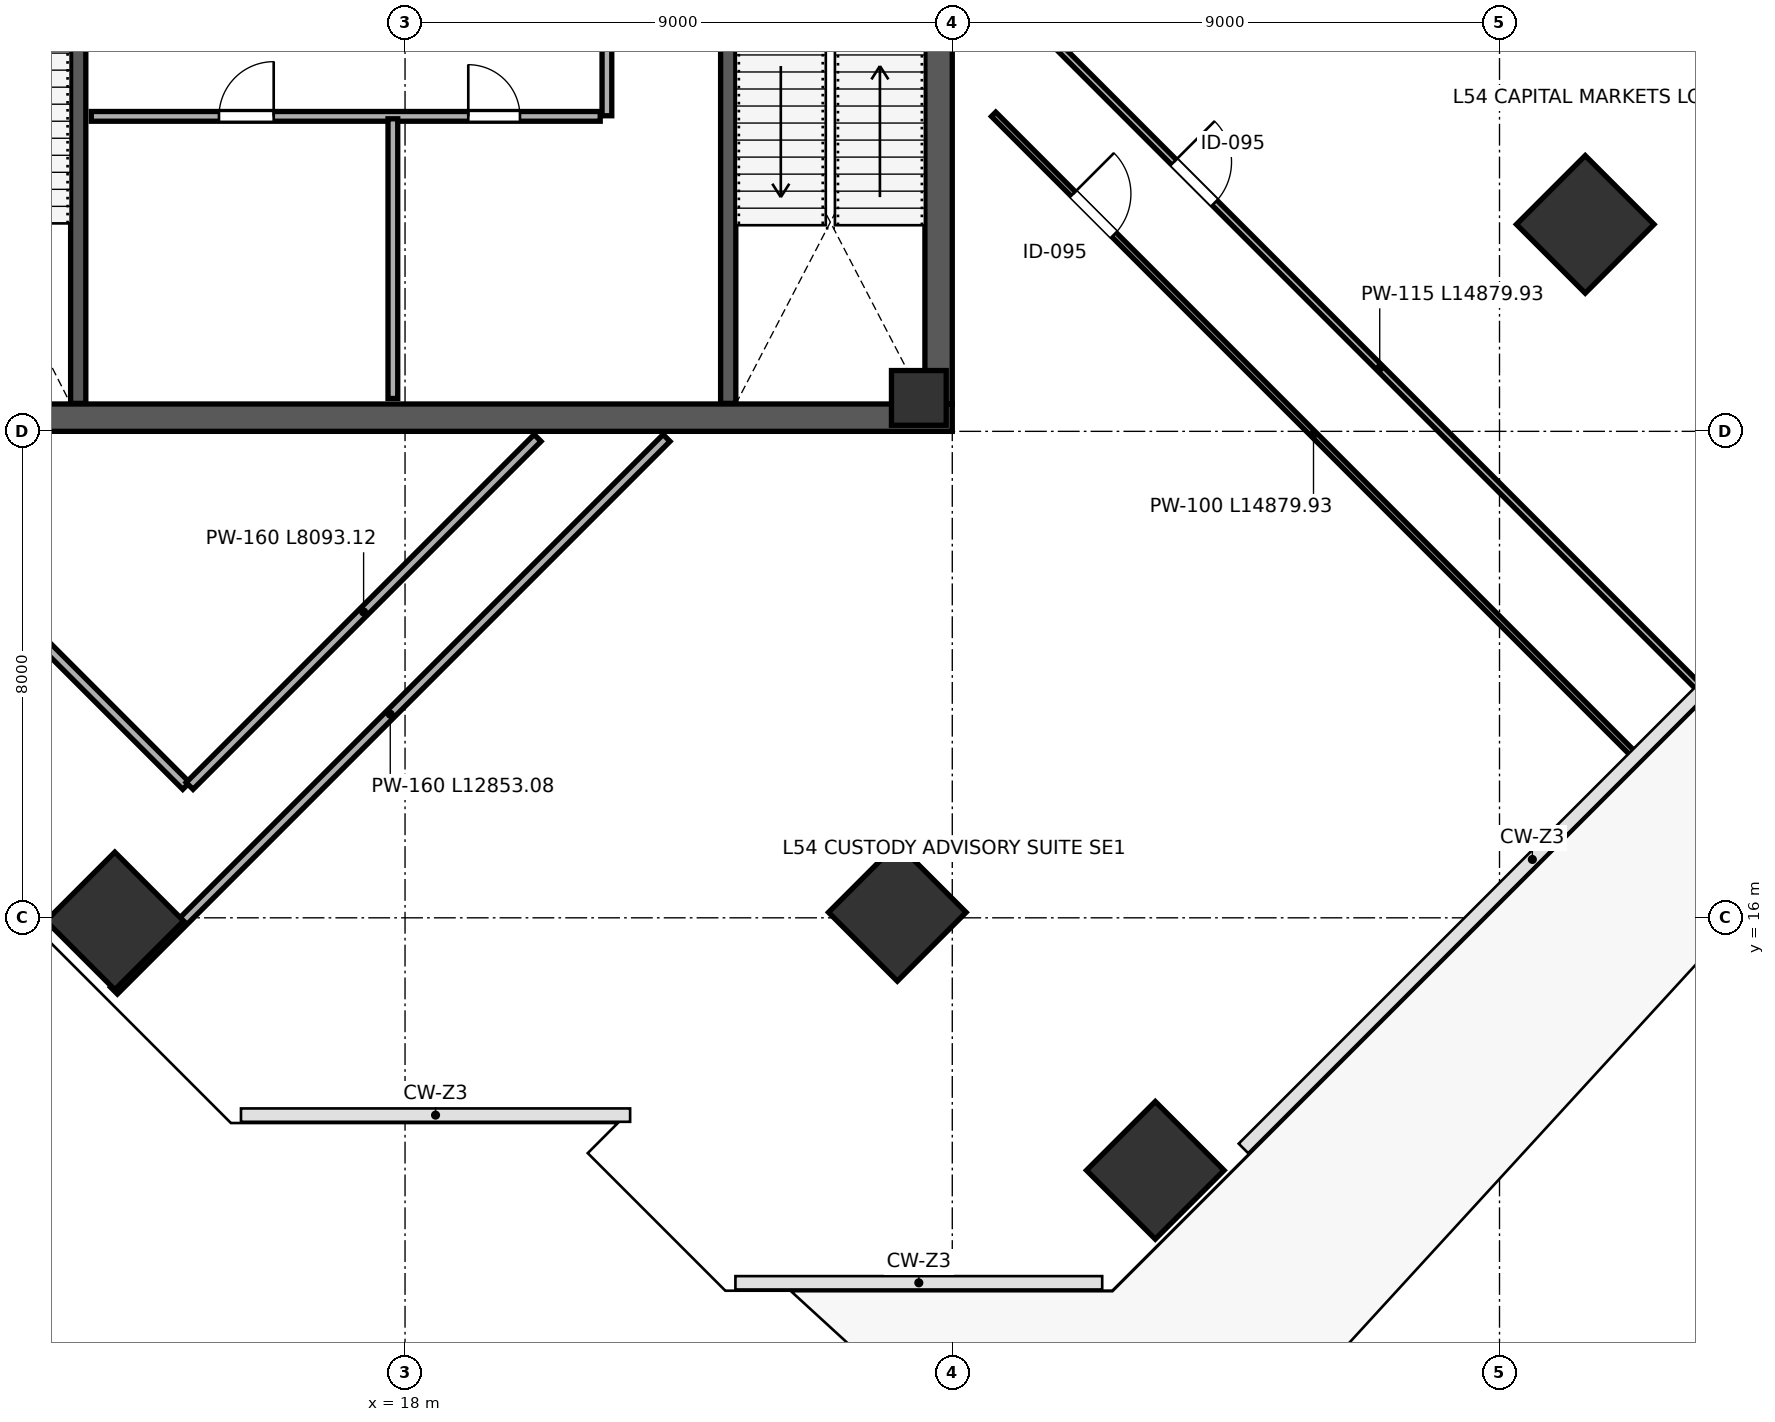
"""IFC4 building model, lengths in metres.
Left out: names, types, materials, properties, quantities, classifications, styles, units other than length and angle.
Written with IfcOpenShell. Run it as: python <this file> out.ifc"""

import sys

from ifc_helpers import new_model, si_unit, direction, frame, frame_2d, origin, origin_2d, place, context, subcontext, project, spatial, rectangle, extrude, source, transform, mapped, element, fill, save


model = new_model("IFC4")
c1 = context("Model", 3, precision=1e-05, world=origin(), true_north=direction((0.0, 1.0)))
c2 = subcontext(c1, "Body", "Model", "MODEL_VIEW")
j1 = project(units=[si_unit("LENGTHUNIT", "METRE"), si_unit("PLANEANGLEUNIT", "RADIAN")], contexts=[c1])
p1 = place(None, origin())
s1 = spatial("IfcSite", under=j1, at=p1, CompositionType="ELEMENT")
p2 = place(p1, origin())
s2 = spatial("IfcBuilding", under=s1, at=p2, CompositionType="ELEMENT")
p3 = place(p2, frame((0.0, 0.0, 241.6)))
s3 = spatial("IfcBuildingStorey", under=s2, at=p3, CompositionType="ELEMENT", Elevation=241.6)
m1 = source(origin(), c2, "Body", "SweptSolid", [
    extrude(rectangle(XDim=0.9, YDim=0.9, at=origin_2d()), origin(), (0.0, 0.0, 1.0), 4.198),
])
p4 = place(p3, frame((26.45, 24.55, 0.001), z_axis=(0.0, 0.0, 1.0), x_axis=(1.0, 0.0, 0.0)))
e1 = element("IfcColumn", 1, at=p4, inside=s3, PredefinedType="COLUMN", context=c2, shape_type="MappedRepresentation", body=[
    mapped(m1, transform((0.0, 0.0, 0.0), scale=1.0)),
])
m2 = source(origin(), c2, "Body", "SweptSolid", [
    extrude(rectangle(XDim=1.6, YDim=1.6, at=origin_2d()), origin(), (0.0, 0.0, 1.0), 4.198),
])
p5 = place(p3, frame((13.227, 15.949, 0.001), z_axis=(0.0, 0.0, 1.0), x_axis=(-0.707106781187, 0.707106781187, 0.0)))
e2 = element("IfcColumn", 2, at=p5, inside=s3, PredefinedType="COLUMN", context=c2, shape_type="MappedRepresentation", body=[
    mapped(m2, transform((0.0, 0.0, 0.0), scale=1.0)),
])
m3 = source(origin(), c2, "Body", "SweptSolid", [
    extrude(rectangle(XDim=1.6, YDim=1.6, at=origin_2d()), origin(), (0.0, 0.0, 1.0), 4.198),
])
for number, where, z_axis, x_axis in (
    (3, (26.096, 16.09, 0.001), (0.0, 0.0, 1.0), (-0.707, 0.707, 0.0)),
    (4, (37.41, 27.404, 0.001), (0.0, 0.0, 1.0), (-0.707, 0.707, 0.0)),
):
    element("IfcColumn", number, at=place(p3, frame(where, z_axis=z_axis, x_axis=x_axis)), inside=s3, PredefinedType="COLUMN", context=c2, shape_type="MappedRepresentation", body=[
        mapped(m3, transform((0.0, 0.0, 0.0), scale=1.0)),
    ])
p6 = place(p3, frame((30.339, 11.847, 0.001), z_axis=(0.0, 0.0, 1.0), x_axis=(-0.707106781187, 0.707106781187, 0.0)))
e5 = element("IfcColumn", 5, at=p6, inside=s3, PredefinedType="COLUMN", context=c2, shape_type="MappedRepresentation", body=[
    mapped(m2, transform((0.0, 0.0, 0.0), scale=1.0)),
])
p7 = place(p3, frame((26.775, 24.45, 0.0), z_axis=(0.0, 0.0, 1.0), x_axis=(0.0, 1.0, 0.0)))
e6 = element("IfcWall", 6, at=p7, inside=s3, PredefinedType="SHEAR", context=c2, shape_type="SweptSolid", body=[
    extrude(rectangle(XDim=15.1, YDim=0.45, at=frame_2d((7.55, 0.0))), origin(), (0.0, 0.0, 1.0), 3.96),
])
p8 = place(p7, frame((8.6, 0.0, 0.0)))
e7 = element("IfcOpeningElement", 7, at=p8, cuts=e6, PredefinedType="OPENING", context=c2, shape_type="SweptSolid", body=[
    extrude(rectangle(XDim=1.15, YDim=2.2, at=frame_2d((0.575, 1.1))), frame((0.0, 0.235, 0.0), z_axis=(0.0, -1.0, 0.0), x_axis=(1.0, 0.0, 0.0)), (0.0, 0.0, 1.0), 0.47),
])
p9 = place(p3, frame((9.0, 24.225, 0.0), z_axis=(0.0, 0.0, 1.0), x_axis=(1.0, 0.0, 0.0)))
e8 = element("IfcWall", 8, at=p9, inside=s3, PredefinedType="SHEAR", context=c2, shape_type="SweptSolid", body=[
    extrude(rectangle(XDim=18.0, YDim=0.45, at=frame_2d((9.0, 0.0))), origin(), (0.0, 0.0, 1.0), 3.96),
])
p10 = place(p3, frame((12.625, 24.46, 0.0), z_axis=(0.0, 0.0, 1.0), x_axis=(0.0, 1.0, 0.0)))
e9 = element("IfcWall", 9, at=p10, inside=s3, PredefinedType="SHEAR", context=c2, shape_type="SweptSolid", body=[
    extrude(rectangle(XDim=7.49, YDim=0.25, at=frame_2d((3.745, 0.0))), origin(), (0.0, 0.0, 1.0), 3.96),
])
p11 = place(p10, frame((5.85, 0.0, 0.0)))
e10 = element("IfcOpeningElement", 10, at=p11, cuts=e9, PredefinedType="OPENING", context=c2, shape_type="SweptSolid", body=[
    extrude(rectangle(XDim=1.15, YDim=2.2, at=frame_2d((0.575, 1.1))), frame((0.0, 0.135, 0.0), z_axis=(0.0, -1.0, 0.0), x_axis=(1.0, 0.0, 0.0)), (0.0, 0.0, 1.0), 0.27),
])
p12 = place(p3, frame((23.315, 24.46, 0.0), z_axis=(0.0, 0.0, 1.0), x_axis=(0.0, 1.0, 0.0)))
e11 = element("IfcWall", 11, at=p12, inside=s3, PredefinedType="SHEAR", context=c2, shape_type="SweptSolid", body=[
    extrude(rectangle(XDim=7.49, YDim=0.25, at=frame_2d((3.745, 0.0))), origin(), (0.0, 0.0, 1.0), 3.96),
])
p13 = place(p3, frame((12.84, 29.18, 0.0), z_axis=(0.0, 0.0, 1.0), x_axis=(1.0, 0.0, 0.0)))
e12 = element("IfcWall", 12, at=p13, inside=s3, PredefinedType="PARTITIONING", context=c2, shape_type="SweptSolid", body=[
    extrude(rectangle(XDim=8.37, YDim=0.16, at=frame_2d((4.185, 0.0))), origin(), (0.0, 0.0, 1.0), 3.96),
])
p14 = place(p13, frame((2.1, 0.0, 0.0)))
e13 = element("IfcOpeningElement", 13, at=p14, cuts=e12, PredefinedType="OPENING", context=c2, shape_type="SweptSolid", body=[
    extrude(rectangle(XDim=0.9, YDim=2.15, at=frame_2d((0.45, 1.075))), frame((0.0, 0.09, 0.0), z_axis=(0.0, -1.0, 0.0), x_axis=(1.0, 0.0, 0.0)), (0.0, 0.0, 1.0), 0.18),
])
p15 = place(p13, frame((6.2, 0.0, 0.0)))
e14 = element("IfcOpeningElement", 14, at=p15, cuts=e12, PredefinedType="OPENING", context=c2, shape_type="SweptSolid", body=[
    extrude(rectangle(XDim=0.85, YDim=2.1, at=frame_2d((0.425, 1.05))), frame((0.0, 0.09, 0.0), z_axis=(0.0, -1.0, 0.0), x_axis=(1.0, 0.0, 0.0)), (0.0, 0.0, 1.0), 0.18),
])
p16 = place(p3, frame((17.8, 24.54, 0.0), z_axis=(0.0, 0.0, 1.0), x_axis=(0.0, 1.0, 0.0)))
e15 = element("IfcWall", 15, at=p16, inside=s3, PredefinedType="PARTITIONING", context=c2, shape_type="SweptSolid", body=[
    extrude(rectangle(XDim=4.6, YDim=0.16, at=frame_2d((2.3, 0.0))), origin(), (0.0, 0.0, 1.0), 3.96),
])
p17 = place(p3, frame((21.32, 29.19, 0.0), z_axis=(0.0, 0.0, 1.0), x_axis=(0.0, 1.0, 0.0)))
e16 = element("IfcWall", 16, at=p17, inside=s3, PredefinedType="PARTITIONING", context=c2, shape_type="SweptSolid", body=[
    extrude(rectangle(XDim=2.92, YDim=0.16, at=frame_2d((1.46, 0.0))), origin(), (0.0, 0.0, 1.0), 3.96),
])
p18 = place(p3, frame((4.452, 28.118, 0.0), z_axis=(0.0, 0.0, 1.0), x_axis=(0.707106781187, -0.707106781187, 0.0)))
e17 = element("IfcWall", 17, at=p18, inside=s3, PredefinedType="PARTITIONING", context=c2, shape_type="SweptSolid", body=[
    extrude(rectangle(XDim=14.07, YDim=0.16, at=frame_2d((7.035, 0.0))), origin(), (0.0, 0.0, 1.0), 3.96),
])
p19 = place(p18, frame((1.15, 0.0, 0.0)))
e18 = element("IfcOpeningElement", 18, at=p19, cuts=e17, PredefinedType="OPENING", context=c2, shape_type="SweptSolid", body=[
    extrude(rectangle(XDim=0.95, YDim=2.15, at=frame_2d((0.475, 1.075))), frame((0.0, 0.09, 0.0), z_axis=(0.0, -1.0, 0.0), x_axis=(1.0, 0.0, 0.0)), (0.0, 0.0, 1.0), 0.18),
])
p20 = place(p3, frame((14.457, 18.169, 0.0), z_axis=(0.0, 0.0, 1.0), x_axis=(0.707106781187, 0.707106781187, 0.0)))
e19 = element("IfcWall", 19, at=p20, inside=s3, PredefinedType="PARTITIONING", context=c2, shape_type="SweptSolid", body=[
    extrude(rectangle(XDim=8.093, YDim=0.16, at=frame_2d((4.046, 0.0))), origin(), (0.0, 0.0, 1.0), 3.96),
])
p21 = place(p3, frame((13.213, 14.803, 0.0), z_axis=(0.0, 0.0, 1.0), x_axis=(0.707116278481, 0.707097283765, 0.0)))
e20 = element("IfcWall", 20, at=p21, inside=s3, PredefinedType="PARTITIONING", context=c2, shape_type="SweptSolid", body=[
    extrude(rectangle(XDim=12.853, YDim=0.16, at=frame_2d((6.427, 0.0))), origin(), (0.0, 0.0, 1.0), 3.96),
])
p22 = place(p3, frame((28.769, 30.303, 0.0), z_axis=(0.0, 0.0, 1.0), x_axis=(0.707106781187, -0.707106781187, 0.0)))
e21 = element("IfcWall", 21, at=p22, inside=s3, PredefinedType="PARTITIONING", context=c2, shape_type="SweptSolid", body=[
    extrude(rectangle(XDim=14.88, YDim=0.115, at=frame_2d((7.44, 0.0))), origin(), (0.0, 0.0, 1.0), 3.96),
])
p23 = place(p22, frame((2.65, 0.0, 0.0)))
e22 = element("IfcOpeningElement", 22, at=p23, cuts=e21, PredefinedType="OPENING", context=c2, shape_type="SweptSolid", body=[
    extrude(rectangle(XDim=0.95, YDim=2.15, at=frame_2d((0.475, 1.075))), frame((0.0, 0.067, 0.0), z_axis=(0.0, -1.0, 0.0), x_axis=(1.0, 0.0, 0.0)), (0.0, 0.0, 1.0), 0.135),
])
p24 = place(p3, frame((27.68, 29.214, 0.0), z_axis=(0.0, 0.0, 1.0), x_axis=(0.707106781187, -0.707106781187, 0.0)))
e23 = element("IfcWall", 23, at=p24, inside=s3, PredefinedType="PARTITIONING", context=c2, shape_type="SweptSolid", body=[
    extrude(rectangle(XDim=14.88, YDim=0.1, at=frame_2d((7.44, 0.0))), origin(), (0.0, 0.0, 1.0), 3.96),
])
p25 = place(p24, frame((1.85, 0.0, 0.0)))
e24 = element("IfcOpeningElement", 24, at=p25, cuts=e23, PredefinedType="OPENING", context=c2, shape_type="SweptSolid", body=[
    extrude(rectangle(XDim=0.95, YDim=2.15, at=frame_2d((0.475, 1.075))), frame((0.0, 0.06, 0.0), z_axis=(0.0, -1.0, 0.0), x_axis=(1.0, 0.0, 0.0)), (0.0, 0.0, 1.0), 0.12),
])
m4 = source(origin(), c2, "Body", "SweptSolid", [
    extrude(rectangle(XDim=0.9, YDim=2.15, at=frame_2d((0.45, 1.075))), frame((0.0, 0.025, 0.0), z_axis=(0.0, -1.0, 0.0), x_axis=(1.0, 0.0, 0.0)), (0.0, 0.0, 1.0), 0.05),
])
p26 = place(p14, origin())
e25 = element("IfcDoor", 25, at=p26, inside=s3, OperationType="SINGLE_SWING_RIGHT", PredefinedType="DOOR", context=c2, shape_type="MappedRepresentation", body=[
    mapped(m4, transform((0.0, 0.0, 0.0), scale=1.0)),
])
fill(e13, e25)
m5 = source(origin(), c2, "Body", "SweptSolid", [
    extrude(rectangle(XDim=0.85, YDim=2.1, at=frame_2d((0.425, 1.05))), frame((0.0, 0.025, 0.0), z_axis=(0.0, -1.0, 0.0), x_axis=(1.0, 0.0, 0.0)), (0.0, 0.0, 1.0), 0.05),
])
p27 = place(p15, origin())
e26 = element("IfcDoor", 26, at=p27, inside=s3, OperationType="SINGLE_SWING_LEFT", PredefinedType="DOOR", context=c2, shape_type="MappedRepresentation", body=[
    mapped(m5, transform((0.0, 0.0, 0.0), scale=1.0)),
])
fill(e14, e26)
m6 = source(origin(), c2, "Body", "SweptSolid", [
    extrude(rectangle(XDim=0.95, YDim=2.15, at=frame_2d((0.475, 1.075))), frame((0.0, 0.025, 0.0), z_axis=(0.0, -1.0, 0.0), x_axis=(1.0, 0.0, 0.0)), (0.0, 0.0, 1.0), 0.05),
])
p28 = place(p23, origin())
e27 = element("IfcDoor", 27, at=p28, inside=s3, OperationType="SINGLE_SWING_LEFT", PredefinedType="DOOR", context=c2, shape_type="MappedRepresentation", body=[
    mapped(m6, transform((0.0, 0.0, 0.0), scale=1.0)),
])
fill(e22, e27)
p29 = place(p25, origin())
e28 = element("IfcDoor", 28, at=p29, inside=s3, OperationType="SINGLE_SWING_LEFT", PredefinedType="DOOR", context=c2, shape_type="MappedRepresentation", body=[
    mapped(m6, transform((0.0, 0.0, 0.0), scale=1.0)),
])
fill(e24, e28)
save(model, sys.argv[1])
